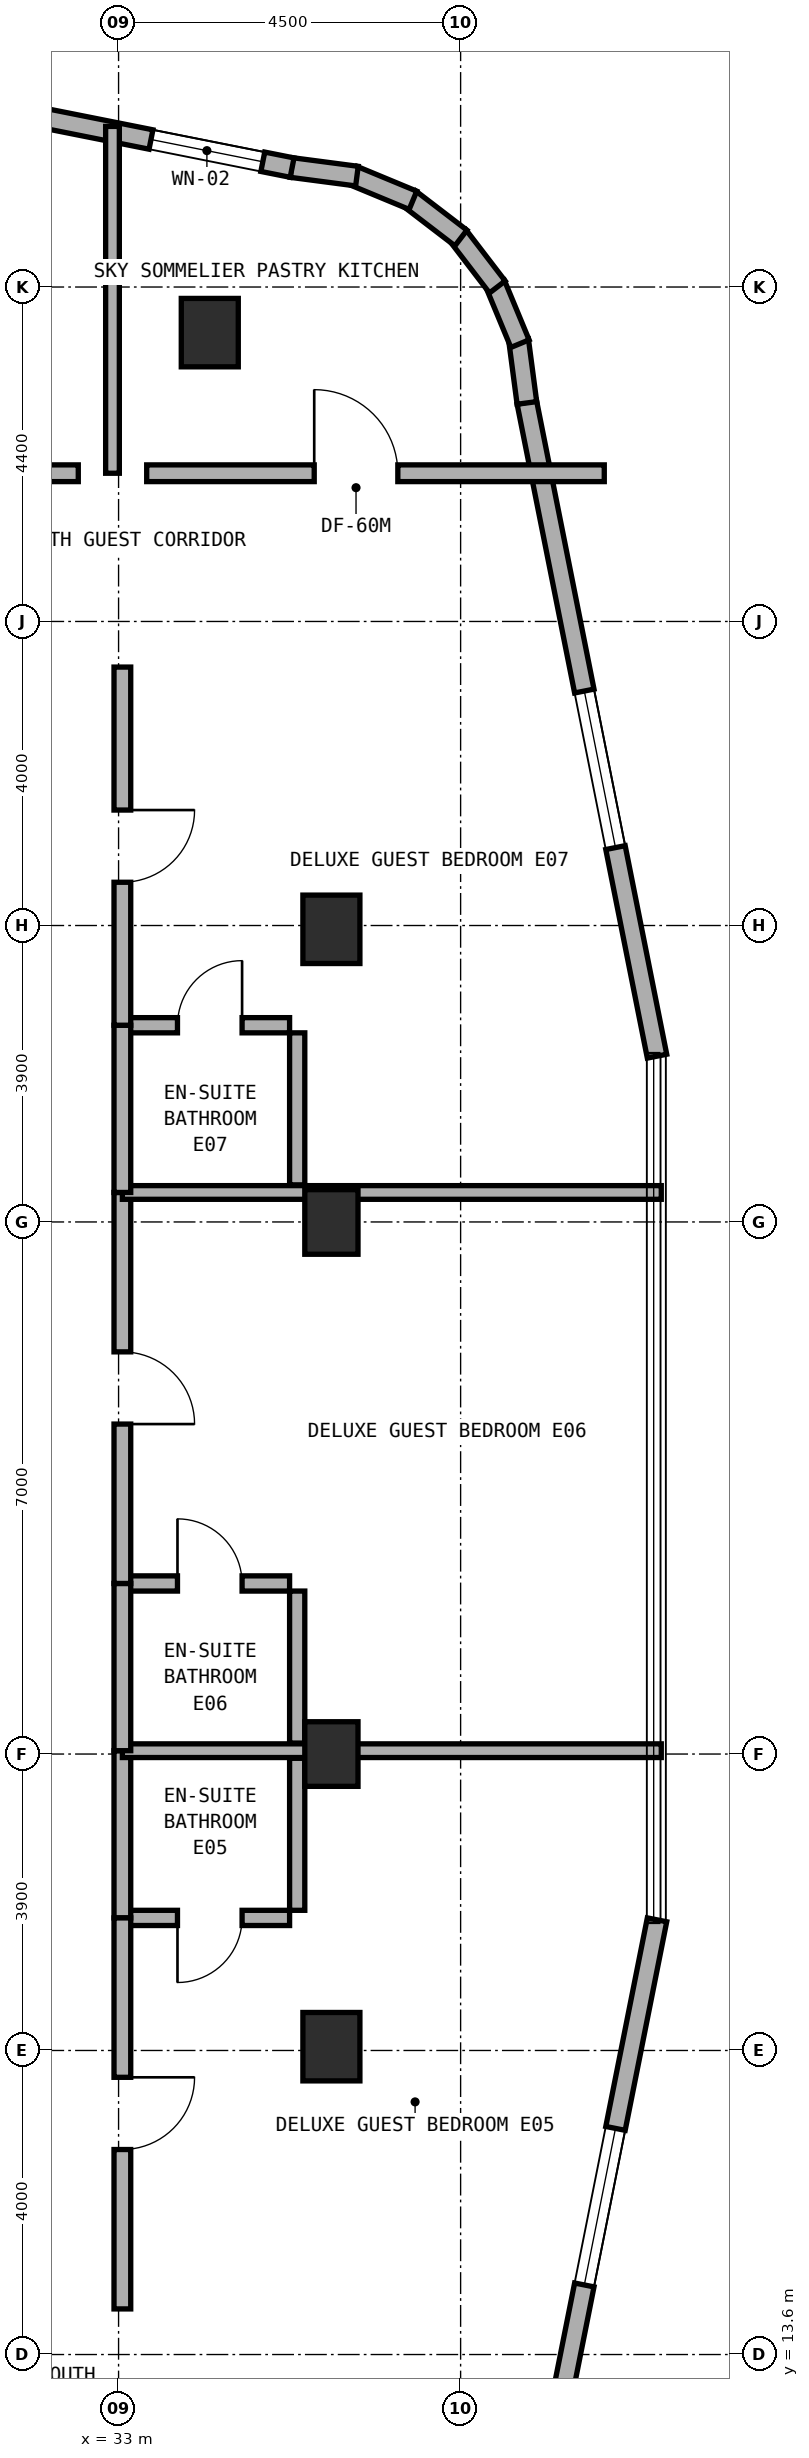
"""IFC4 building model, lengths in metres.
Left out: names, types, materials, properties, quantities, classifications, styles, units other than length and angle.
Written with IfcOpenShell. Run it as: python <this file> out.ifc"""

import sys

from ifc_helpers import new_model, si_unit, direction, frame, frame_2d, origin, origin_2d, place, context, subcontext, project, spatial, rectangle, extrude, element, fill, save


model = new_model("IFC4")
c1 = context("Model", 3, precision=1e-05, world=origin(), true_north=direction((0.0, 1.0)))
c2 = subcontext(c1, "Body", "Model", "MODEL_VIEW")
j1 = project(units=[si_unit("LENGTHUNIT", "METRE"), si_unit("PLANEANGLEUNIT", "RADIAN")], contexts=[c1])
p1 = place(None, origin())
s1 = spatial("IfcSite", under=j1, at=p1, CompositionType="ELEMENT")
p2 = place(p1, origin())
s2 = spatial("IfcBuilding", under=s1, at=p2, CompositionType="ELEMENT")
p3 = place(p2, frame((0.0, 0.0, 209.9)))
s3 = spatial("IfcBuildingStorey", under=s2, at=p3, CompositionType="ELEMENT", Elevation=209.9)
p4 = place(p3, frame((34.2, 40.2, 0.0), z_axis=(0.0, 0.0, 1.0), x_axis=(1.0, 0.0, 0.0)))
e1 = element("IfcColumn", 1, at=p4, inside=s3, PredefinedType="COLUMN", context=c2, shape_type="SweptSolid", body=[
    extrude(rectangle(XDim=0.75, YDim=0.9, at=origin_2d()), origin(), (0.0, 0.0, 1.0), 3.6),
])
for number, where, z_axis, x_axis in (
    (2, (35.8, 21.5, 0.0), (0.0, 0.0, 1.0), (1.0, 0.0, 0.0)),
    (3, (35.8, 28.5, 0.0), (0.0, 0.0, 1.0), (1.0, 0.0, 0.0)),
):
    element("IfcColumn", number, at=place(p3, frame(where, z_axis=z_axis, x_axis=x_axis)), inside=s3, PredefinedType="COLUMN", context=c2, shape_type="SweptSolid", body=[
        extrude(rectangle(XDim=0.7, YDim=0.85, at=origin_2d()), origin(), (0.0, 0.0, 1.0), 3.6),
    ])
for number, where, z_axis, x_axis in (
    (4, (35.8, 17.65, 0.0), (0.0, 0.0, 1.0), (1.0, 0.0, 0.0)),
    (5, (35.8, 32.35, 0.0), (0.0, 0.0, 1.0), (1.0, 0.0, 0.0)),
):
    element("IfcColumn", number, at=place(p3, frame(where, z_axis=z_axis, x_axis=x_axis)), inside=s3, PredefinedType="COLUMN", context=c2, shape_type="SweptSolid", body=[
        extrude(rectangle(XDim=0.75, YDim=0.9, at=origin_2d()), origin(), (0.0, 0.0, 1.0), 3.6),
    ])
p5 = place(p3, frame((38.371, 10.717, 0.0), z_axis=(0.0, 0.0, 1.0), x_axis=(0.195291715883, 0.980745199176, 0.0)))
e6 = element("IfcWall", 6, at=p5, inside=s3, PredefinedType="STANDARD", context=c2, shape_type="SweptSolid", body=[
    extrude(rectangle(XDim=8.771, YDim=0.26, at=frame_2d((4.385, 0.0))), origin(), (0.0, 0.0, 1.0), 3.32),
])
p6 = place(p5, frame((3.873, 0.0, 0.85)))
e7 = element("IfcOpeningElement", 7, at=p6, cuts=e6, PredefinedType="OPENING", context=c2, shape_type="SweptSolid", body=[
    extrude(rectangle(XDim=2.1, YDim=1.5, at=frame_2d((1.05, 0.75))), frame((0.0, 0.14, 0.0), z_axis=(0.0, -1.0, 0.0), x_axis=(1.0, 0.0, 0.0)), (0.0, 0.0, 1.0), 0.28),
])
p7 = place(p3, frame((40.084, 30.681, 0.0), z_axis=(0.0, 0.0, 1.0), x_axis=(-0.195291715883, 0.980745199176, 0.0)))
e8 = element("IfcWall", 8, at=p7, inside=s3, PredefinedType="STANDARD", context=c2, shape_type="SweptSolid", body=[
    extrude(rectangle(XDim=8.771, YDim=0.26, at=frame_2d((4.385, 0.0))), origin(), (0.0, 0.0, 1.0), 3.32),
])
p8 = place(p7, frame((2.798, 0.0, 0.85)))
e9 = element("IfcOpeningElement", 9, at=p8, cuts=e8, PredefinedType="OPENING", context=c2, shape_type="SweptSolid", body=[
    extrude(rectangle(XDim=2.1, YDim=1.5, at=frame_2d((1.05, 0.75))), frame((0.0, 0.14, 0.0), z_axis=(0.0, -1.0, 0.0), x_axis=(1.0, 0.0, 0.0)), (0.0, 0.0, 1.0), 0.28),
])
p9 = place(p3, frame((38.372, 39.275, 0.0), z_axis=(0.0, 0.0, 1.0), x_axis=(-0.130954667764, 0.9913883573, 0.0)))
e10 = element("IfcWall", 10, at=p9, inside=s3, PredefinedType="STANDARD", context=c2, shape_type="SweptSolid", body=[
    extrude(rectangle(XDim=0.833, YDim=0.26, at=frame_2d((0.417, 0.0))), origin(), (0.0, 0.0, 1.0), 3.32),
])
p10 = place(p3, frame((38.281, 40.055, 0.0), z_axis=(0.0, 0.0, 1.0), x_axis=(-0.382985169477, 0.923754491172, 0.0)))
e11 = element("IfcWall", 11, at=p10, inside=s3, PredefinedType="STANDARD", context=c2, shape_type="SweptSolid", body=[
    extrude(rectangle(XDim=0.851, YDim=0.26, at=frame_2d((0.426, 0.0))), origin(), (0.0, 0.0, 1.0), 3.32),
])
for number, where, z_axis, x_axis in (
    (12, (37.983, 40.801, 0.0), (0.0, 0.0, 1.0), (-0.608, 0.794, 0.0)),
    (13, (37.504, 41.445, 0.0), (0.0, 0.0, 1.0), (-0.794, 0.608, 0.0)),
):
    element("IfcWall", number, at=place(p3, frame(where, z_axis=z_axis, x_axis=x_axis)), inside=s3, PredefinedType="STANDARD", context=c2, shape_type="SweptSolid", body=[
        extrude(rectangle(XDim=0.85, YDim=0.26, at=frame_2d((0.425, 0.0))), origin(), (0.0, 0.0, 1.0), 3.32),
    ])
p11 = place(p3, frame((36.873, 41.941, 0.0), z_axis=(0.0, 0.0, 1.0), x_axis=(-0.923652976167, 0.383229930484, 0.0)))
e14 = element("IfcWall", 14, at=p11, inside=s3, PredefinedType="STANDARD", context=c2, shape_type="SweptSolid", body=[
    extrude(rectangle(XDim=0.851, YDim=0.26, at=frame_2d((0.426, 0.0))), origin(), (0.0, 0.0, 1.0), 3.32),
])
p12 = place(p3, frame((36.136, 42.259, 0.0), z_axis=(0.0, 0.0, 1.0), x_axis=(-0.991493480548, 0.130156359936, 0.0)))
e15 = element("IfcWall", 15, at=p12, inside=s3, PredefinedType="STANDARD", context=c2, shape_type="SweptSolid", body=[
    extrude(rectangle(XDim=0.868, YDim=0.26, at=frame_2d((0.434, 0.0))), origin(), (0.0, 0.0, 1.0), 3.32),
])
p13 = place(p3, frame((35.283, 42.371, 0.0), z_axis=(0.0, 0.0, 1.0), x_axis=(-0.980745199176, 0.195291715883, 0.0)))
e16 = element("IfcWall", 16, at=p13, inside=s3, PredefinedType="STANDARD", context=c2, shape_type="SweptSolid", body=[
    extrude(rectangle(XDim=8.771, YDim=0.26, at=frame_2d((4.385, 0.0))), origin(), (0.0, 0.0, 1.0), 3.32),
])
p14 = place(p13, frame((0.393, 0.0, 0.85)))
e17 = element("IfcOpeningElement", 17, at=p14, cuts=e16, PredefinedType="OPENING", context=c2, shape_type="SweptSolid", body=[
    extrude(rectangle(XDim=1.5, YDim=1.5, at=frame_2d((0.75, 0.75))), frame((0.0, 0.14, 0.0), z_axis=(0.0, -1.0, 0.0), x_axis=(1.0, 0.0, 0.0)), (0.0, 0.0, 1.0), 0.28),
])
p15 = place(p13, frame((4.577, 0.0, 0.85)))
e18 = element("IfcOpeningElement", 18, at=p15, cuts=e16, PredefinedType="OPENING", context=c2, shape_type="SweptSolid", body=[
    extrude(rectangle(XDim=2.1, YDim=1.5, at=frame_2d((1.05, 0.75))), frame((0.0, 0.14, 0.0), z_axis=(0.0, -1.0, 0.0), x_axis=(1.0, 0.0, 0.0)), (0.0, 0.0, 1.0), 0.28),
])
p16 = place(p3, frame((32.92, 38.35, 0.0), z_axis=(0.0, 0.0, 1.0), x_axis=(0.0, 1.0, 0.0)))
e19 = element("IfcWall", 19, at=p16, inside=s3, PredefinedType="SOLIDWALL", context=c2, shape_type="SweptSolid", body=[
    extrude(rectangle(XDim=4.563, YDim=0.18, at=frame_2d((2.281, 0.0))), origin(), (0.0, 0.0, 1.0), 2.935),
])
p17 = place(p3, frame((26.45, 38.35, 0.0), z_axis=(0.0, 0.0, 1.0), x_axis=(1.0, 0.0, 0.0)))
e20 = element("IfcWall", 20, at=p17, inside=s3, PredefinedType="SOLIDWALL", context=c2, shape_type="SweptSolid", body=[
    extrude(rectangle(XDim=6.02, YDim=0.22, at=frame_2d((3.01, 0.0))), origin(), (0.0, 0.0, 1.0), 2.695),
])
p18 = place(p17, frame((2.204, 0.0, 0.0)))
e21 = element("IfcOpeningElement", 21, at=p18, cuts=e20, PredefinedType="OPENING", context=c2, shape_type="SweptSolid", body=[
    extrude(rectangle(XDim=1.1, YDim=2.1, at=frame_2d((0.55, 1.05))), frame((0.0, 0.12, 0.0), z_axis=(0.0, -1.0, 0.0), x_axis=(1.0, 0.0, 0.0)), (0.0, 0.0, 1.0), 0.24),
])
p19 = place(p3, frame((33.37, 38.35, 0.0), z_axis=(0.0, 0.0, 1.0), x_axis=(1.0, 0.0, 0.0)))
e22 = element("IfcWall", 22, at=p19, inside=s3, PredefinedType="SOLIDWALL", context=c2, shape_type="SweptSolid", body=[
    extrude(rectangle(XDim=6.02, YDim=0.22, at=frame_2d((3.01, 0.0))), origin(), (0.0, 0.0, 1.0), 2.695),
])
p20 = place(p19, frame((2.204, 0.0, 0.0)))
e23 = element("IfcOpeningElement", 23, at=p20, cuts=e22, PredefinedType="OPENING", context=c2, shape_type="SweptSolid", body=[
    extrude(rectangle(XDim=1.1, YDim=2.1, at=frame_2d((0.55, 1.05))), frame((0.0, 0.12, 0.0), z_axis=(0.0, -1.0, 0.0), x_axis=(1.0, 0.0, 0.0)), (0.0, 0.0, 1.0), 0.24),
])
p21 = place(p3, frame((33.15, 19.344, 0.0), z_axis=(0.0, 0.0, 1.0), x_axis=(1.0, 0.0, 0.0)))
e24 = element("IfcWall", 24, at=p21, inside=s3, PredefinedType="PLUMBINGWALL", context=c2, shape_type="SweptSolid", body=[
    extrude(rectangle(XDim=2.1, YDim=0.2, at=frame_2d((1.05, 0.0))), origin(), (0.0, 0.0, 1.0), 3.32),
])
p22 = place(p21, frame((0.625, 0.0, 0.0)))
e25 = element("IfcOpeningElement", 25, at=p22, cuts=e24, PredefinedType="OPENING", context=c2, shape_type="SweptSolid", body=[
    extrude(rectangle(XDim=0.85, YDim=2.1, at=frame_2d((0.425, 1.05))), frame((0.0, 0.11, 0.0), z_axis=(0.0, -1.0, 0.0), x_axis=(1.0, 0.0, 0.0)), (0.0, 0.0, 1.0), 0.22),
])
p23 = place(p3, frame((35.35, 19.444, 0.0), z_axis=(0.0, 0.0, 1.0), x_axis=(0.0, 1.0, 0.0)))
e26 = element("IfcWall", 26, at=p23, inside=s3, PredefinedType="PLUMBINGWALL", context=c2, shape_type="SweptSolid", body=[
    extrude(rectangle(XDim=2.0, YDim=0.2, at=frame_2d((1.0, 0.0))), origin(), (0.0, 0.0, 1.0), 3.32),
])
p24 = place(p3, frame((33.05, 19.344, 0.0), z_axis=(0.0, 0.0, 1.0), x_axis=(0.0, 1.0, 0.0)))
e27 = element("IfcWall", 27, at=p24, inside=s3, PredefinedType="SOLIDWALL", context=c2, shape_type="SweptSolid", body=[
    extrude(rectangle(XDim=2.2, YDim=0.22, at=frame_2d((1.1, 0.0))), origin(), (0.0, 0.0, 1.0), 2.695),
])
p25 = place(p3, frame((33.05, 14.2, 0.0), z_axis=(0.0, 0.0, 1.0), x_axis=(0.0, 1.0, 0.0)))
e28 = element("IfcWall", 28, at=p25, inside=s3, PredefinedType="SOLIDWALL", context=c2, shape_type="SweptSolid", body=[
    extrude(rectangle(XDim=5.144, YDim=0.22, at=frame_2d((2.572, 0.0))), origin(), (0.0, 0.0, 1.0), 2.695),
])
p26 = place(p25, frame((2.097, 0.0, 0.0)))
e29 = element("IfcOpeningElement", 29, at=p26, cuts=e28, PredefinedType="OPENING", context=c2, shape_type="SweptSolid", body=[
    extrude(rectangle(XDim=0.95, YDim=2.1, at=frame_2d((0.475, 1.05))), frame((0.0, 0.12, 0.0), z_axis=(0.0, -1.0, 0.0), x_axis=(1.0, 0.0, 0.0)), (0.0, 0.0, 1.0), 0.24),
])
p27 = place(p3, frame((33.05, 21.544, 0.0), z_axis=(0.0, 0.0, 1.0), x_axis=(1.0, 0.0, 0.0)))
e30 = element("IfcWall", 30, at=p27, inside=s3, PredefinedType="SOLIDWALL", context=c2, shape_type="SweptSolid", body=[
    extrude(rectangle(XDim=7.09, YDim=0.18, at=frame_2d((3.545, 0.0))), origin(), (0.0, 0.0, 1.0), 2.695),
])
p28 = place(p3, frame((33.15, 23.744, 0.0), z_axis=(0.0, 0.0, 1.0), x_axis=(1.0, 0.0, 0.0)))
e31 = element("IfcWall", 31, at=p28, inside=s3, PredefinedType="PLUMBINGWALL", context=c2, shape_type="SweptSolid", body=[
    extrude(rectangle(XDim=2.1, YDim=0.2, at=frame_2d((1.05, 0.0))), origin(), (0.0, 0.0, 1.0), 3.32),
])
p29 = place(p28, frame((0.625, 0.0, 0.0)))
e32 = element("IfcOpeningElement", 32, at=p29, cuts=e31, PredefinedType="OPENING", context=c2, shape_type="SweptSolid", body=[
    extrude(rectangle(XDim=0.85, YDim=2.1, at=frame_2d((0.425, 1.05))), frame((0.0, 0.11, 0.0), z_axis=(0.0, -1.0, 0.0), x_axis=(1.0, 0.0, 0.0)), (0.0, 0.0, 1.0), 0.22),
])
p30 = place(p3, frame((35.35, 21.644, 0.0), z_axis=(0.0, 0.0, 1.0), x_axis=(0.0, 1.0, 0.0)))
e33 = element("IfcWall", 33, at=p30, inside=s3, PredefinedType="PLUMBINGWALL", context=c2, shape_type="SweptSolid", body=[
    extrude(rectangle(XDim=2.0, YDim=0.2, at=frame_2d((1.0, 0.0))), origin(), (0.0, 0.0, 1.0), 3.32),
])
p31 = place(p3, frame((33.05, 21.544, 0.0), z_axis=(0.0, 0.0, 1.0), x_axis=(0.0, 1.0, 0.0)))
e34 = element("IfcWall", 34, at=p31, inside=s3, PredefinedType="SOLIDWALL", context=c2, shape_type="SweptSolid", body=[
    extrude(rectangle(XDim=2.2, YDim=0.22, at=frame_2d((1.1, 0.0))), origin(), (0.0, 0.0, 1.0), 3.32),
])
p32 = place(p3, frame((33.05, 23.744, 0.0), z_axis=(0.0, 0.0, 1.0), x_axis=(0.0, 1.0, 0.0)))
e35 = element("IfcWall", 35, at=p32, inside=s3, PredefinedType="SOLIDWALL", context=c2, shape_type="SweptSolid", body=[
    extrude(rectangle(XDim=5.144, YDim=0.22, at=frame_2d((2.572, 0.0))), origin(), (0.0, 0.0, 1.0), 2.695),
])
p33 = place(p32, frame((2.097, 0.0, 0.0)))
e36 = element("IfcOpeningElement", 36, at=p33, cuts=e35, PredefinedType="OPENING", context=c2, shape_type="SweptSolid", body=[
    extrude(rectangle(XDim=0.95, YDim=2.1, at=frame_2d((0.475, 1.05))), frame((0.0, 0.12, 0.0), z_axis=(0.0, -1.0, 0.0), x_axis=(1.0, 0.0, 0.0)), (0.0, 0.0, 1.0), 0.24),
])
p34 = place(p3, frame((33.05, 28.888, 0.0), z_axis=(0.0, 0.0, 1.0), x_axis=(1.0, 0.0, 0.0)))
e37 = element("IfcWall", 37, at=p34, inside=s3, PredefinedType="SOLIDWALL", context=c2, shape_type="SweptSolid", body=[
    extrude(rectangle(XDim=7.09, YDim=0.18, at=frame_2d((3.545, 0.0))), origin(), (0.0, 0.0, 1.0), 3.015),
])
p35 = place(p3, frame((33.15, 31.088, 0.0), z_axis=(0.0, 0.0, 1.0), x_axis=(1.0, 0.0, 0.0)))
e38 = element("IfcWall", 38, at=p35, inside=s3, PredefinedType="PLUMBINGWALL", context=c2, shape_type="SweptSolid", body=[
    extrude(rectangle(XDim=2.1, YDim=0.2, at=frame_2d((1.05, 0.0))), origin(), (0.0, 0.0, 1.0), 3.32),
])
p36 = place(p35, frame((0.625, 0.0, 0.0)))
e39 = element("IfcOpeningElement", 39, at=p36, cuts=e38, PredefinedType="OPENING", context=c2, shape_type="SweptSolid", body=[
    extrude(rectangle(XDim=0.85, YDim=2.1, at=frame_2d((0.425, 1.05))), frame((0.0, 0.11, 0.0), z_axis=(0.0, -1.0, 0.0), x_axis=(1.0, 0.0, 0.0)), (0.0, 0.0, 1.0), 0.22),
])
p37 = place(p3, frame((35.35, 28.988, 0.0), z_axis=(0.0, 0.0, 1.0), x_axis=(0.0, 1.0, 0.0)))
e40 = element("IfcWall", 40, at=p37, inside=s3, PredefinedType="PLUMBINGWALL", context=c2, shape_type="SweptSolid", body=[
    extrude(rectangle(XDim=2.0, YDim=0.2, at=frame_2d((1.0, 0.0))), origin(), (0.0, 0.0, 1.0), 3.32),
])
p38 = place(p3, frame((33.05, 28.888, 0.0), z_axis=(0.0, 0.0, 1.0), x_axis=(0.0, 1.0, 0.0)))
e41 = element("IfcWall", 41, at=p38, inside=s3, PredefinedType="SOLIDWALL", context=c2, shape_type="SweptSolid", body=[
    extrude(rectangle(XDim=2.2, YDim=0.22, at=frame_2d((1.1, 0.0))), origin(), (0.0, 0.0, 1.0), 3.32),
])
p39 = place(p3, frame((33.05, 31.088, 0.0), z_axis=(0.0, 0.0, 1.0), x_axis=(0.0, 1.0, 0.0)))
e42 = element("IfcWall", 42, at=p39, inside=s3, PredefinedType="SOLIDWALL", context=c2, shape_type="SweptSolid", body=[
    extrude(rectangle(XDim=4.712, YDim=0.22, at=frame_2d((2.356, 0.0))), origin(), (0.0, 0.0, 1.0), 2.695),
])
p40 = place(p39, frame((1.881, 0.0, 0.0)))
e43 = element("IfcOpeningElement", 43, at=p40, cuts=e42, PredefinedType="OPENING", context=c2, shape_type="SweptSolid", body=[
    extrude(rectangle(XDim=0.95, YDim=2.1, at=frame_2d((0.475, 1.05))), frame((0.0, 0.12, 0.0), z_axis=(0.0, -1.0, 0.0), x_axis=(1.0, 0.0, 0.0)), (0.0, 0.0, 1.0), 0.24),
])
p41 = place(p6, origin())
e44 = element("IfcWindow", 44, at=p41, inside=s3, PartitioningType="SINGLE_PANEL", PredefinedType="WINDOW", context=c2, shape_type="SweptSolid", body=[
    extrude(rectangle(XDim=2.1, YDim=1.5, at=frame_2d((1.05, 0.75))), frame((0.0, 0.03, 0.0), z_axis=(0.0, -1.0, 0.0), x_axis=(1.0, 0.0, 0.0)), (0.0, 0.0, 1.0), 0.06),
])
fill(e7, e44)
p42 = place(p8, origin())
e45 = element("IfcWindow", 45, at=p42, inside=s3, PartitioningType="SINGLE_PANEL", PredefinedType="WINDOW", context=c2, shape_type="SweptSolid", body=[
    extrude(rectangle(XDim=2.1, YDim=1.5, at=frame_2d((1.05, 0.75))), frame((0.0, 0.03, 0.0), z_axis=(0.0, -1.0, 0.0), x_axis=(1.0, 0.0, 0.0)), (0.0, 0.0, 1.0), 0.06),
])
fill(e9, e45)
p43 = place(p14, origin())
e46 = element("IfcWindow", 46, at=p43, inside=s3, PartitioningType="SINGLE_PANEL", PredefinedType="WINDOW", context=c2, shape_type="SweptSolid", body=[
    extrude(rectangle(XDim=1.5, YDim=1.5, at=frame_2d((0.75, 0.75))), frame((0.0, 0.03, 0.0), z_axis=(0.0, -1.0, 0.0), x_axis=(1.0, 0.0, 0.0)), (0.0, 0.0, 1.0), 0.06),
])
fill(e17, e46)
p44 = place(p20, origin())
e47 = element("IfcDoor", 47, at=p44, inside=s3, OperationType="SINGLE_SWING_LEFT", PredefinedType="DOOR", context=c2, shape_type="SweptSolid", body=[
    extrude(rectangle(XDim=1.1, YDim=2.1, at=frame_2d((0.55, 1.05))), frame((0.0, 0.025, 0.0), z_axis=(0.0, -1.0, 0.0), x_axis=(1.0, 0.0, 0.0)), (0.0, 0.0, 1.0), 0.05),
])
fill(e23, e47)
p45 = place(p22, frame((0.85, 0.0, 0.0), z_axis=(0.0, 0.0, 1.0), x_axis=(-1.0, 0.0, 0.0)))
e48 = element("IfcDoor", 48, at=p45, inside=s3, OperationType="SINGLE_SWING_RIGHT", PredefinedType="DOOR", context=c2, shape_type="SweptSolid", body=[
    extrude(rectangle(XDim=0.85, YDim=2.1, at=frame_2d((0.425, 1.05))), frame((0.0, 0.025, 0.0), z_axis=(0.0, -1.0, 0.0), x_axis=(1.0, 0.0, 0.0)), (0.0, 0.0, 1.0), 0.05),
])
fill(e25, e48)
p46 = place(p26, frame((0.95, 0.0, 0.0), z_axis=(0.0, 0.0, 1.0), x_axis=(-1.0, 0.0, 0.0)))
e49 = element("IfcDoor", 49, at=p46, inside=s3, OperationType="SINGLE_SWING_LEFT", PredefinedType="DOOR", context=c2, shape_type="SweptSolid", body=[
    extrude(rectangle(XDim=0.95, YDim=2.1, at=frame_2d((0.475, 1.05))), frame((0.0, 0.025, 0.0), z_axis=(0.0, -1.0, 0.0), x_axis=(1.0, 0.0, 0.0)), (0.0, 0.0, 1.0), 0.05),
])
fill(e29, e49)
p47 = place(p29, origin())
e50 = element("IfcDoor", 50, at=p47, inside=s3, OperationType="SINGLE_SWING_LEFT", PredefinedType="DOOR", context=c2, shape_type="SweptSolid", body=[
    extrude(rectangle(XDim=0.85, YDim=2.1, at=frame_2d((0.425, 1.05))), frame((0.0, 0.025, 0.0), z_axis=(0.0, -1.0, 0.0), x_axis=(1.0, 0.0, 0.0)), (0.0, 0.0, 1.0), 0.05),
])
fill(e32, e50)
p48 = place(p33, frame((0.95, 0.0, 0.0), z_axis=(0.0, 0.0, 1.0), x_axis=(-1.0, 0.0, 0.0)))
e51 = element("IfcDoor", 51, at=p48, inside=s3, OperationType="SINGLE_SWING_RIGHT", PredefinedType="DOOR", context=c2, shape_type="SweptSolid", body=[
    extrude(rectangle(XDim=0.95, YDim=2.1, at=frame_2d((0.475, 1.05))), frame((0.0, 0.025, 0.0), z_axis=(0.0, -1.0, 0.0), x_axis=(1.0, 0.0, 0.0)), (0.0, 0.0, 1.0), 0.05),
])
fill(e36, e51)
p49 = place(p36, origin())
e52 = element("IfcDoor", 52, at=p49, inside=s3, OperationType="SINGLE_SWING_RIGHT", PredefinedType="DOOR", context=c2, shape_type="SweptSolid", body=[
    extrude(rectangle(XDim=0.85, YDim=2.1, at=frame_2d((0.425, 1.05))), frame((0.0, 0.025, 0.0), z_axis=(0.0, -1.0, 0.0), x_axis=(1.0, 0.0, 0.0)), (0.0, 0.0, 1.0), 0.05),
])
fill(e39, e52)
p50 = place(p40, frame((0.95, 0.0, 0.0), z_axis=(0.0, 0.0, 1.0), x_axis=(-1.0, 0.0, 0.0)))
e53 = element("IfcDoor", 53, at=p50, inside=s3, OperationType="SINGLE_SWING_LEFT", PredefinedType="DOOR", context=c2, shape_type="SweptSolid", body=[
    extrude(rectangle(XDim=0.95, YDim=2.1, at=frame_2d((0.475, 1.05))), frame((0.0, 0.025, 0.0), z_axis=(0.0, -1.0, 0.0), x_axis=(1.0, 0.0, 0.0)), (0.0, 0.0, 1.0), 0.05),
])
fill(e43, e53)
save(model, sys.argv[1])
